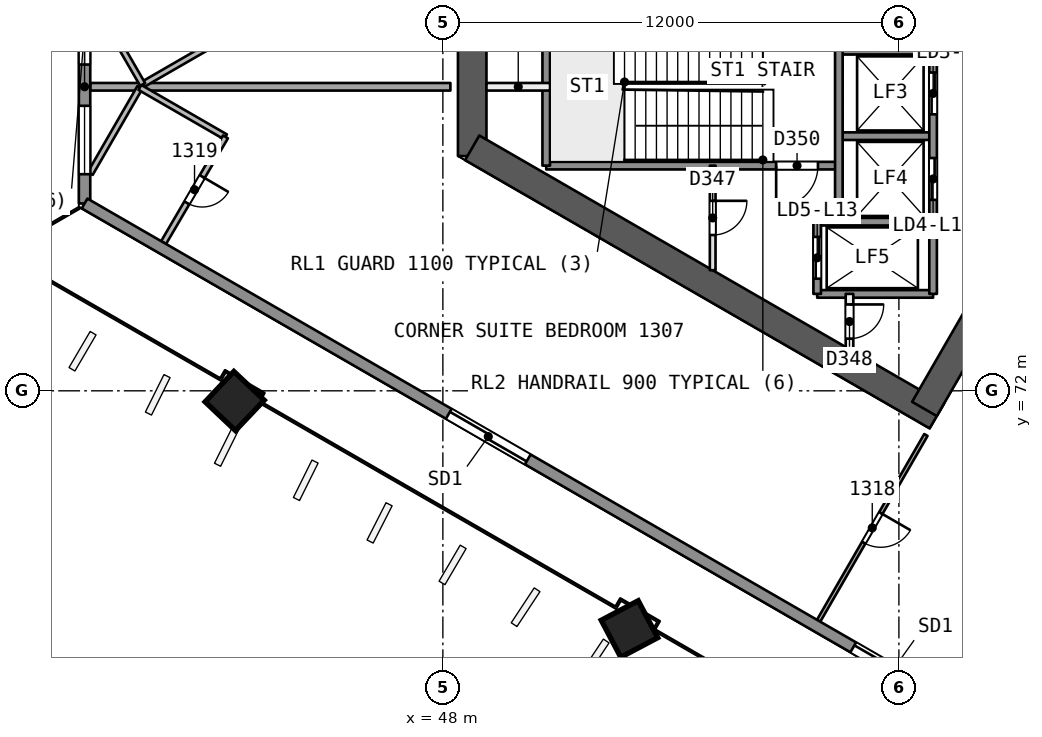
"""IFC4 building model, lengths in metres.
Left out: names, types, materials, properties, quantities, classifications, styles, units other than length and angle.
Written with IfcOpenShell. Run it as: python <this file> out.ifc"""

import sys

from ifc_helpers import new_model, si_unit, direction, frame, frame_2d, origin, origin_2d, place, context, subcontext, project, spatial, rectangle, extrude, element, fill, save


model = new_model("IFC4")
c1 = context("Model", 3, precision=1e-05, world=origin(), true_north=direction((0.0, 1.0)))
c2 = subcontext(c1, "Body", "Model", "MODEL_VIEW")
j1 = project(units=[si_unit("LENGTHUNIT", "METRE"), si_unit("PLANEANGLEUNIT", "RADIAN")], contexts=[c1])
p1 = place(None, origin())
s1 = spatial("IfcSite", under=j1, at=p1, CompositionType="ELEMENT")
p2 = place(p1, origin())
s2 = spatial("IfcBuilding", under=s1, at=p2, CompositionType="ELEMENT")
p3 = place(p2, frame((0.0, 0.0, 61.0)))
s3 = spatial("IfcBuildingStorey", under=s2, at=p3, CompositionType="ELEMENT", Elevation=61.0)
p4 = place(p3, frame((65.567, 80.0, 0.0), z_axis=(0.0, 0.0, 1.0), x_axis=(-0.499988615364, 0.866031976607, 0.0)))
e1 = element("IfcWall", 1, at=p4, inside=s3, PredefinedType="SHEAR", context=c2, shape_type="SweptSolid", body=[
    extrude(rectangle(XDim=10.163, YDim=0.75, at=frame_2d((5.082, 0.0))), origin(), (0.0, 0.0, 1.0), 3.7),
])
p5 = place(p4, frame((0.733, 0.0, 0.0)))
e2 = element("IfcOpeningElement", 2, at=p5, cuts=e1, PredefinedType="OPENING", context=c2, shape_type="SweptSolid", body=[
    extrude(rectangle(XDim=1.2, YDim=2.1, at=frame_2d((0.6, 1.05))), frame((0.0, 0.385, 0.0), z_axis=(0.0, -1.0, 0.0), x_axis=(1.0, 0.0, 0.0)), (0.0, 0.0, 1.0), 0.771),
])
p6 = place(p3, frame((48.772, 81.606, 0.0), z_axis=(0.0, 0.0, 1.0), x_axis=(0.0, -1.0, 0.0)))
e3 = element("IfcWall", 3, at=p6, inside=s3, PredefinedType="SHEAR", context=c2, shape_type="SweptSolid", body=[
    extrude(rectangle(XDim=3.429, YDim=0.75, at=frame_2d((1.714, 0.0))), origin(), (0.0, 0.0, 1.0), 3.7),
])
p7 = place(p3, frame((48.772, 78.394, 0.0), z_axis=(0.0, 0.0, 1.0), x_axis=(0.866028339916, -0.499994914436, 0.0)))
e4 = element("IfcWall", 4, at=p7, inside=s3, PredefinedType="SHEAR", context=c2, shape_type="SweptSolid", body=[
    extrude(rectangle(XDim=14.117, YDim=0.75, at=frame_2d((7.059, 0.0))), origin(), (0.0, 0.0, 1.0), 3.7),
])
p8 = place(p3, frame((60.673, 71.523, 0.0), z_axis=(0.0, 0.0, 1.0), x_axis=(0.499997052475, 0.866027105532, 0.0)))
e5 = element("IfcWall", 5, at=p8, inside=s3, PredefinedType="SHEAR", context=c2, shape_type="SweptSolid", body=[
    extrude(rectangle(XDim=10.005, YDim=0.75, at=frame_2d((5.002, 0.0))), origin(), (0.0, 0.0, 1.0), 3.7),
])
p9 = place(p8, frame((7.855, 0.0, 0.0)))
e6 = element("IfcOpeningElement", 6, at=p9, cuts=e5, PredefinedType="OPENING", context=c2, shape_type="SweptSolid", body=[
    extrude(rectangle(XDim=1.2, YDim=2.1, at=frame_2d((0.6, 1.05))), frame((0.0, 0.385, 0.0), z_axis=(0.0, -1.0, 0.0), x_axis=(1.0, 0.0, 0.0)), (0.0, 0.0, 1.0), 0.771),
])
p10 = place(p3, frame((42.487, 71.724, 0.0), z_axis=(0.028493212074, 0.006793520471, 0.999570900409), x_axis=(-0.865580919578, 0.50031701382, 0.021273395238)))
e7 = element("IfcColumn", 7, at=p10, inside=s3, PredefinedType="COLUMN", context=c2, shape_type="SweptSolid", body=[
    extrude(rectangle(XDim=1.1, YDim=1.1, at=origin_2d()), origin(), (0.0, 0.0, 1.0), 3.702),
])
p11 = place(p3, frame((52.887, 65.719, 0.0), z_axis=(0.019328516974, 0.012138044789, 0.999739504221), x_axis=(-0.865689041461, 0.500468616527, 0.010660551878)))
e8 = element("IfcColumn", 8, at=p11, inside=s3, PredefinedType="COLUMN", context=c2, shape_type="SweptSolid", body=[
    extrude(rectangle(XDim=1.1, YDim=1.1, at=origin_2d()), origin(), (0.0, 0.0, 1.0), 3.701),
])
p12 = place(p3, frame((42.352, 81.36, 0.0), z_axis=(0.0, 0.0, 1.0), x_axis=(-0.865997922154, -0.500047596559, 0.0)))
e9 = element("IfcWall", 9, at=p12, inside=s3, PredefinedType="PARTITIONING", context=c2, shape_type="SweptSolid", body=[
    extrude(rectangle(XDim=2.6, YDim=0.15, at=frame_2d((1.3, 0.0))), origin(), (0.0, 0.0, 1.0), 3.2),
])
p13 = place(p3, frame((40.1, 80.06, 0.0), z_axis=(0.0, 0.0, 1.0), x_axis=(-0.50001084716, 0.866019141083, 0.0)))
e10 = element("IfcWall", 10, at=p13, inside=s3, PredefinedType="PARTITIONING", context=c2, shape_type="SweptSolid", body=[
    extrude(rectangle(XDim=2.76, YDim=0.15, at=frame_2d((1.38, 0.0))), origin(), (0.0, 0.0, 1.0), 3.2),
])
p14 = place(p3, frame((38.72, 80.0, 0.0), z_axis=(0.0, 0.0, 1.0), x_axis=(1.0, 0.0, 0.0)))
e11 = element("IfcWall", 11, at=p14, inside=s3, PredefinedType="PARTITIONING", context=c2, shape_type="SweptSolid", body=[
    extrude(rectangle(XDim=9.478, YDim=0.2, at=frame_2d((4.739, 0.0))), origin(), (0.0, 0.0, 1.0), 3.2),
])
p15 = place(p3, frame((60.71, 70.838, 0.0), z_axis=(0.0, 0.0, 1.0), x_axis=(-0.49999444814, -0.866028609128, 0.0)))
e12 = element("IfcWall", 12, at=p15, inside=s3, PredefinedType="PARTITIONING", context=c2, shape_type="SweptSolid", body=[
    extrude(rectangle(XDim=5.646, YDim=0.1, at=frame_2d((2.823, 0.0))), origin(), (0.0, 0.0, 1.0), 3.2),
])
p16 = place(p15, frame((2.373, 0.0, 0.0)))
e13 = element("IfcOpeningElement", 13, at=p16, cuts=e12, PredefinedType="OPENING", context=c2, shape_type="SweptSolid", body=[
    extrude(rectangle(XDim=0.9, YDim=2.1, at=frame_2d((0.45, 1.05))), frame((0.0, 0.061, 0.0), z_axis=(0.0, -1.0, 0.0), x_axis=(1.0, 0.0, 0.0)), (0.0, 0.0, 1.0), 0.121),
])
p17 = place(p3, frame((38.72, 77.718, 0.0), z_axis=(0.0, 0.0, 1.0), x_axis=(0.499964911226, 0.86604566135, 0.0)))
e14 = element("IfcWall", 14, at=p17, inside=s3, PredefinedType="PARTITIONING", context=c2, shape_type="SweptSolid", body=[
    extrude(rectangle(XDim=2.615, YDim=0.15, at=frame_2d((1.308, 0.0))), origin(), (0.0, 0.0, 1.0), 3.2),
])
p18 = place(p3, frame((40.028, 79.982, 0.0), z_axis=(0.0, 0.0, 1.0), x_axis=(0.866021400173, -0.500006934395, 0.0)))
e15 = element("IfcWall", 15, at=p18, inside=s3, PredefinedType="PARTITIONING", context=c2, shape_type="SweptSolid", body=[
    extrude(rectangle(XDim=2.6, YDim=0.15, at=frame_2d((1.3, 0.0))), origin(), (0.0, 0.0, 1.0), 3.2),
])
p19 = place(p3, frame((42.279, 78.682, 0.0), z_axis=(0.0, 0.0, 1.0), x_axis=(-0.505132426168, -0.863041848367, 0.0)))
e16 = element("IfcWall", 16, at=p19, inside=s3, PredefinedType="PARTITIONING", context=c2, shape_type="SweptSolid", body=[
    extrude(rectangle(XDim=3.224, YDim=0.15, at=frame_2d((1.612, 0.0))), origin(), (0.0, 0.0, 1.0), 3.2),
])
p20 = place(p19, frame((1.212, 0.0, 0.0)))
e17 = element("IfcOpeningElement", 17, at=p20, cuts=e16, PredefinedType="OPENING", context=c2, shape_type="SweptSolid", body=[
    extrude(rectangle(XDim=0.8, YDim=2.1, at=frame_2d((0.4, 1.05))), frame((0.0, 0.085, 0.0), z_axis=(0.0, -1.0, 0.0), x_axis=(1.0, 0.0, 0.0)), (0.0, 0.0, 1.0), 0.171),
])
p21 = place(p3, frame((38.571, 76.929, 0.0), z_axis=(0.0, 0.0, 1.0), x_axis=(0.0, 1.0, 0.0)))
e18 = element("IfcWall", 18, at=p21, inside=s3, PredefinedType="SOLIDWALL", context=c2, shape_type="SweptSolid", body=[
    extrude(rectangle(XDim=6.143, YDim=0.3, at=frame_2d((3.071, 0.0))), origin(), (0.0, 0.0, 1.0), 3.2),
])
p22 = place(p21, frame((3.656, 0.0, 0.9)))
e19 = element("IfcOpeningElement", 19, at=p22, cuts=e18, PredefinedType="OPENING", context=c2, shape_type="SweptSolid", body=[
    extrude(rectangle(XDim=1.8, YDim=1.5, at=frame_2d((0.9, 0.75))), frame((0.0, 0.161, 0.0), z_axis=(0.0, -1.0, 0.0), x_axis=(1.0, 0.0, 0.0)), (0.0, 0.0, 1.0), 0.321),
])
p23 = place(p21, frame((0.771, 0.0, 0.9)))
e20 = element("IfcOpeningElement", 20, at=p23, cuts=e18, PredefinedType="OPENING", context=c2, shape_type="SweptSolid", body=[
    extrude(rectangle(XDim=1.8, YDim=1.5, at=frame_2d((0.9, 0.75))), frame((0.0, 0.161, 0.0), z_axis=(0.0, -1.0, 0.0), x_axis=(1.0, 0.0, 0.0)), (0.0, 0.0, 1.0), 0.321),
])
p24 = place(p3, frame((90.555, 46.916, 0.0), z_axis=(0.0, 0.0, 1.0), x_axis=(-0.866024926003, 0.500000827541, 0.0)))
e21 = element("IfcWall", 21, at=p24, inside=s3, PredefinedType="SOLIDWALL", context=c2, shape_type="SweptSolid", body=[
    extrude(rectangle(XDim=60.025, YDim=0.3, at=frame_2d((30.013, 0.0))), origin(), (0.0, 0.0, 1.0), 3.2),
])
p25 = place(p24, frame((28.813, 0.0, 0.0)))
e22 = element("IfcOpeningElement", 22, at=p25, cuts=e21, PredefinedType="OPENING", context=c2, shape_type="SweptSolid", body=[
    extrude(rectangle(XDim=2.4, YDim=2.4, at=frame_2d((1.2, 1.2))), frame((0.0, 0.161, 0.0), z_axis=(0.0, -1.0, 0.0), x_axis=(1.0, 0.0, 0.0)), (0.0, 0.0, 1.0), 0.321),
])
p26 = place(p24, frame((34.269, 0.0, 0.0)))
e23 = element("IfcOpeningElement", 23, at=p26, cuts=e21, PredefinedType="OPENING", context=c2, shape_type="SweptSolid", body=[
    extrude(rectangle(XDim=2.4, YDim=2.4, at=frame_2d((1.2, 1.2))), frame((0.0, 0.161, 0.0), z_axis=(0.0, -1.0, 0.0), x_axis=(1.0, 0.0, 0.0)), (0.0, 0.0, 1.0), 0.321),
])
p27 = place(p24, frame((46.558, 0.0, 0.0)))
e24 = element("IfcOpeningElement", 24, at=p27, cuts=e21, PredefinedType="OPENING", context=c2, shape_type="SweptSolid", body=[
    extrude(rectangle(XDim=2.4, YDim=2.4, at=frame_2d((1.2, 1.2))), frame((0.0, 0.161, 0.0), z_axis=(0.0, -1.0, 0.0), x_axis=(1.0, 0.0, 0.0)), (0.0, 0.0, 1.0), 0.321),
])
p28 = place(p24, frame((23.357, 0.0, 0.0)))
e25 = element("IfcOpeningElement", 25, at=p28, cuts=e21, PredefinedType="OPENING", context=c2, shape_type="SweptSolid", body=[
    extrude(rectangle(XDim=2.4, YDim=2.4, at=frame_2d((1.2, 1.2))), frame((0.0, 0.161, 0.0), z_axis=(0.0, -1.0, 0.0), x_axis=(1.0, 0.0, 0.0)), (0.0, 0.0, 1.0), 0.321),
])
p29 = place(p24, frame((11.109, 0.0, 0.0)))
e26 = element("IfcOpeningElement", 26, at=p29, cuts=e21, PredefinedType="OPENING", context=c2, shape_type="SweptSolid", body=[
    extrude(rectangle(XDim=2.4, YDim=2.4, at=frame_2d((1.2, 1.2))), frame((0.0, 0.161, 0.0), z_axis=(0.0, -1.0, 0.0), x_axis=(1.0, 0.0, 0.0)), (0.0, 0.0, 1.0), 0.321),
])
p30 = place(p3, frame((60.9, 80.95, 0.0), z_axis=(0.0, 0.0, 1.0), x_axis=(-1.0, 0.0, 0.0)))
e27 = element("IfcWall", 27, at=p30, inside=s3, PredefinedType="SOLIDWALL", context=c2, shape_type="SweptSolid", body=[
    extrude(rectangle(XDim=2.48, YDim=0.2, at=frame_2d((1.24, 0.0))), origin(), (0.0, 0.0, 1.0), 3.2),
])
p31 = place(p3, frame((50.82, 80.0, 0.0), z_axis=(0.0, 0.0, 1.0), x_axis=(-1.0, 0.0, 0.0)))
e28 = element("IfcWall", 28, at=p31, inside=s3, PredefinedType="PARTITIONING", context=c2, shape_type="SweptSolid", body=[
    extrude(rectangle(XDim=1.673, YDim=0.2, at=frame_2d((0.836, 0.0))), origin(), (0.0, 0.0, 1.0), 3.2),
])
p32 = place(p3, frame((60.9, 78.7, 0.0), z_axis=(0.0, 0.0, 1.0), x_axis=(-1.0, 0.0, 0.0)))
e29 = element("IfcWall", 29, at=p32, inside=s3, PredefinedType="SOLIDWALL", context=c2, shape_type="SweptSolid", body=[
    extrude(rectangle(XDim=2.48, YDim=0.2, at=frame_2d((1.24, 0.0))), origin(), (0.0, 0.0, 1.0), 3.2),
])
p33 = place(p3, frame((58.42, 77.925, 0.0), z_axis=(0.0, 0.0, 1.0), x_axis=(-1.0, 0.0, 0.0)))
e30 = element("IfcWall", 30, at=p33, inside=s3, PredefinedType="SOLIDWALL", context=c2, shape_type="SweptSolid", body=[
    extrude(rectangle(XDim=7.7, YDim=0.2, at=frame_2d((3.85, 0.0))), origin(), (0.0, 0.0, 1.0), 3.2),
])
p34 = place(p33, frame((0.55, 0.0, 0.0)))
e31 = element("IfcOpeningElement", 31, at=p34, cuts=e30, PredefinedType="OPENING", context=c2, shape_type="SweptSolid", body=[
    extrude(rectangle(XDim=1.1, YDim=2.1, at=frame_2d((0.55, 1.05))), frame((0.0, 0.11, 0.0), z_axis=(0.0, -1.0, 0.0), x_axis=(1.0, 0.0, 0.0)), (0.0, 0.0, 1.0), 0.221),
])
for number, where, z_axis, x_axis in (
    (32, (60.9, 76.45, 0.0), (0.0, 0.0, 1.0), (-1.0, 0.0, 0.0)),
    (33, (60.9, 74.55, 0.0), (0.0, 0.0, 1.0), (-1.0, 0.0, 0.0)),
):
    element("IfcWall", number, at=place(p3, frame(where, z_axis=z_axis, x_axis=x_axis)), inside=s3, PredefinedType="SOLIDWALL", context=c2, shape_type="SweptSolid", body=[
        extrude(rectangle(XDim=3.05, YDim=0.2, at=frame_2d((1.525, 0.0))), origin(), (0.0, 0.0, 1.0), 3.2),
    ])
p35 = place(p3, frame((60.9, 85.45, 0.0), z_axis=(0.0, 0.0, 1.0), x_axis=(0.0, -1.0, 0.0)))
e34 = element("IfcWall", 34, at=p35, inside=s3, PredefinedType="SOLIDWALL", context=c2, shape_type="SweptSolid", body=[
    extrude(rectangle(XDim=10.9, YDim=0.2, at=frame_2d((5.45, 0.0))), origin(), (0.0, 0.0, 1.0), 3.2),
])
p36 = place(p35, frame((0.575, 0.0, 0.0)))
e35 = element("IfcOpeningElement", 35, at=p36, cuts=e34, PredefinedType="OPENING", context=c2, shape_type="SweptSolid", body=[
    extrude(rectangle(XDim=1.1, YDim=2.1, at=frame_2d((0.55, 1.05))), frame((0.0, 0.11, 0.0), z_axis=(0.0, -1.0, 0.0), x_axis=(1.0, 0.0, 0.0)), (0.0, 0.0, 1.0), 0.221),
])
p37 = place(p35, frame((2.825, 0.0, 0.0)))
e36 = element("IfcOpeningElement", 36, at=p37, cuts=e34, PredefinedType="OPENING", context=c2, shape_type="SweptSolid", body=[
    extrude(rectangle(XDim=1.1, YDim=2.1, at=frame_2d((0.55, 1.05))), frame((0.0, 0.11, 0.0), z_axis=(0.0, -1.0, 0.0), x_axis=(1.0, 0.0, 0.0)), (0.0, 0.0, 1.0), 0.221),
])
p38 = place(p35, frame((5.075, 0.0, 0.0)))
e37 = element("IfcOpeningElement", 37, at=p38, cuts=e34, PredefinedType="OPENING", context=c2, shape_type="SweptSolid", body=[
    extrude(rectangle(XDim=1.1, YDim=2.1, at=frame_2d((0.55, 1.05))), frame((0.0, 0.11, 0.0), z_axis=(0.0, -1.0, 0.0), x_axis=(1.0, 0.0, 0.0)), (0.0, 0.0, 1.0), 0.221),
])
p39 = place(p35, frame((7.325, 0.0, 0.0)))
e38 = element("IfcOpeningElement", 38, at=p39, cuts=e34, PredefinedType="OPENING", context=c2, shape_type="SweptSolid", body=[
    extrude(rectangle(XDim=1.1, YDim=2.1, at=frame_2d((0.55, 1.05))), frame((0.0, 0.11, 0.0), z_axis=(0.0, -1.0, 0.0), x_axis=(1.0, 0.0, 0.0)), (0.0, 0.0, 1.0), 0.221),
])
p40 = place(p3, frame((58.7, 74.55, 0.0), z_axis=(0.0, 0.0, 1.0), x_axis=(0.0, -1.0, 0.0)))
e39 = element("IfcWall", 39, at=p40, inside=s3, PredefinedType="PARTITIONING", context=c2, shape_type="SweptSolid", body=[
    extrude(rectangle(XDim=1.455, YDim=0.2, at=frame_2d((0.728, 0.0))), origin(), (0.0, 0.0, 1.0), 3.2),
])
p41 = place(p40, frame((0.278, 0.0, 0.0)))
e40 = element("IfcOpeningElement", 40, at=p41, cuts=e39, PredefinedType="OPENING", context=c2, shape_type="SweptSolid", body=[
    extrude(rectangle(XDim=0.9, YDim=2.1, at=frame_2d((0.45, 1.05))), frame((0.0, 0.11, 0.0), z_axis=(0.0, -1.0, 0.0), x_axis=(1.0, 0.0, 0.0)), (0.0, 0.0, 1.0), 0.221),
])
p42 = place(p3, frame((58.42, 85.45, 0.0), z_axis=(0.0, 0.0, 1.0), x_axis=(0.0, -1.0, 0.0)))
e41 = element("IfcWall", 41, at=p42, inside=s3, PredefinedType="SOLIDWALL", context=c2, shape_type="SweptSolid", body=[
    extrude(rectangle(XDim=9.0, YDim=0.2, at=frame_2d((4.5, 0.0))), origin(), (0.0, 0.0, 1.0), 3.2),
])
p43 = place(p3, frame((57.85, 76.45, 0.0), z_axis=(0.0, 0.0, 1.0), x_axis=(0.0, -1.0, 0.0)))
e42 = element("IfcWall", 42, at=p43, inside=s3, PredefinedType="SOLIDWALL", context=c2, shape_type="SweptSolid", body=[
    extrude(rectangle(XDim=1.9, YDim=0.2, at=frame_2d((0.95, 0.0))), origin(), (0.0, 0.0, 1.0), 3.2),
])
p44 = place(p43, frame((0.4, 0.0, 0.0)))
e43 = element("IfcOpeningElement", 43, at=p44, cuts=e42, PredefinedType="OPENING", context=c2, shape_type="SweptSolid", body=[
    extrude(rectangle(XDim=1.1, YDim=2.1, at=frame_2d((0.55, 1.05))), frame((0.0, 0.11, 0.0), z_axis=(0.0, -1.0, 0.0), x_axis=(1.0, 0.0, 0.0)), (0.0, 0.0, 1.0), 0.221),
])
p45 = place(p3, frame((55.1, 77.925, 0.0), z_axis=(0.0, 0.0, 1.0), x_axis=(0.0, -1.0, 0.0)))
e44 = element("IfcWall", 44, at=p45, inside=s3, PredefinedType="PARTITIONING", context=c2, shape_type="SweptSolid", body=[
    extrude(rectangle(XDim=2.752, YDim=0.15, at=frame_2d((1.376, 0.0))), origin(), (0.0, 0.0, 1.0), 3.2),
])
p46 = place(p45, frame((0.926, 0.0, 0.0)))
e45 = element("IfcOpeningElement", 45, at=p46, cuts=e44, PredefinedType="OPENING", context=c2, shape_type="SweptSolid", body=[
    extrude(rectangle(XDim=0.9, YDim=2.1, at=frame_2d((0.45, 1.05))), frame((0.0, 0.085, 0.0), z_axis=(0.0, -1.0, 0.0), x_axis=(1.0, 0.0, 0.0)), (0.0, 0.0, 1.0), 0.171),
])
p47 = place(p3, frame((50.72, 82.075, 0.0), z_axis=(0.0, 0.0, 1.0), x_axis=(0.0, -1.0, 0.0)))
e46 = element("IfcWall", 46, at=p47, inside=s3, PredefinedType="SOLIDWALL", context=c2, shape_type="SweptSolid", body=[
    extrude(rectangle(XDim=4.15, YDim=0.2, at=frame_2d((2.075, 0.0))), origin(), (0.0, 0.0, 1.0), 3.2),
])
p48 = place(p16, origin())
e47 = element("IfcDoor", 47, at=p48, inside=s3, OperationType="SINGLE_SWING_LEFT", PredefinedType="NOTDEFINED", context=c2, shape_type="SweptSolid", body=[
    extrude(rectangle(XDim=0.9, YDim=2.1, at=frame_2d((0.45, 1.05))), frame((0.0, 0.025, 0.0), z_axis=(0.0, -1.0, 0.0), x_axis=(1.0, 0.0, 0.0)), (0.0, 0.0, 1.0), 0.05),
])
fill(e13, e47)
p49 = place(p20, origin())
e48 = element("IfcDoor", 48, at=p49, inside=s3, OperationType="SINGLE_SWING_LEFT", PredefinedType="NOTDEFINED", context=c2, shape_type="SweptSolid", body=[
    extrude(rectangle(XDim=0.8, YDim=2.1, at=frame_2d((0.4, 1.05))), frame((0.0, 0.025, 0.0), z_axis=(0.0, -1.0, 0.0), x_axis=(1.0, 0.0, 0.0)), (0.0, 0.0, 1.0), 0.05),
])
fill(e17, e48)
p50 = place(p22, origin())
e49 = element("IfcWindow", 49, at=p50, inside=s3, PartitioningType="SINGLE_PANEL", PredefinedType="WINDOW", context=c2, shape_type="SweptSolid", body=[
    extrude(rectangle(XDim=1.8, YDim=1.5, at=frame_2d((0.9, 0.75))), frame((0.0, 0.03, 0.0), z_axis=(0.0, -1.0, 0.0), x_axis=(1.0, 0.0, 0.0)), (0.0, 0.0, 1.0), 0.06),
])
fill(e19, e49)
p51 = place(p23, origin())
e50 = element("IfcWindow", 50, at=p51, inside=s3, PartitioningType="SINGLE_PANEL", PredefinedType="WINDOW", context=c2, shape_type="SweptSolid", body=[
    extrude(rectangle(XDim=1.8, YDim=1.5, at=frame_2d((0.9, 0.75))), frame((0.0, 0.03, 0.0), z_axis=(0.0, -1.0, 0.0), x_axis=(1.0, 0.0, 0.0)), (0.0, 0.0, 1.0), 0.06),
])
fill(e20, e50)
p52 = place(p26, origin())
e51 = element("IfcDoor", 51, at=p52, inside=s3, OperationType="SLIDING_TO_RIGHT", PredefinedType="NOTDEFINED", context=c2, shape_type="SweptSolid", body=[
    extrude(rectangle(XDim=2.4, YDim=2.4, at=frame_2d((1.2, 1.2))), frame((0.0, 0.025, 0.0), z_axis=(0.0, -1.0, 0.0), x_axis=(1.0, 0.0, 0.0)), (0.0, 0.0, 1.0), 0.05),
])
fill(e23, e51)
p53 = place(p27, origin())
e52 = element("IfcDoor", 52, at=p53, inside=s3, OperationType="SLIDING_TO_LEFT", PredefinedType="NOTDEFINED", context=c2, shape_type="SweptSolid", body=[
    extrude(rectangle(XDim=2.4, YDim=2.4, at=frame_2d((1.2, 1.2))), frame((0.0, 0.025, 0.0), z_axis=(0.0, -1.0, 0.0), x_axis=(1.0, 0.0, 0.0)), (0.0, 0.0, 1.0), 0.05),
])
fill(e24, e52)
p54 = place(p38, origin())
e53 = element("IfcDoor", 53, at=p54, inside=s3, OperationType="SLIDING_TO_RIGHT", PredefinedType="NOTDEFINED", context=c2, shape_type="SweptSolid", body=[
    extrude(rectangle(XDim=1.1, YDim=2.1, at=frame_2d((0.55, 1.05))), frame((0.0, 0.025, 0.0), z_axis=(0.0, -1.0, 0.0), x_axis=(1.0, 0.0, 0.0)), (0.0, 0.0, 1.0), 0.05),
])
fill(e37, e53)
p55 = place(p39, origin())
e54 = element("IfcDoor", 54, at=p55, inside=s3, OperationType="SLIDING_TO_LEFT", PredefinedType="NOTDEFINED", context=c2, shape_type="SweptSolid", body=[
    extrude(rectangle(XDim=1.1, YDim=2.1, at=frame_2d((0.55, 1.05))), frame((0.0, 0.025, 0.0), z_axis=(0.0, -1.0, 0.0), x_axis=(1.0, 0.0, 0.0)), (0.0, 0.0, 1.0), 0.05),
])
fill(e38, e54)
p56 = place(p44, origin())
e55 = element("IfcDoor", 55, at=p56, inside=s3, OperationType="SLIDING_TO_RIGHT", PredefinedType="NOTDEFINED", context=c2, shape_type="SweptSolid", body=[
    extrude(rectangle(XDim=1.1, YDim=2.1, at=frame_2d((0.55, 1.05))), frame((0.0, 0.025, 0.0), z_axis=(0.0, -1.0, 0.0), x_axis=(1.0, 0.0, 0.0)), (0.0, 0.0, 1.0), 0.05),
])
fill(e43, e55)
p57 = place(p46, origin())
e56 = element("IfcDoor", 56, at=p57, inside=s3, OperationType="SINGLE_SWING_LEFT", PredefinedType="NOTDEFINED", context=c2, shape_type="SweptSolid", body=[
    extrude(rectangle(XDim=0.9, YDim=2.1, at=frame_2d((0.45, 1.05))), frame((0.0, 0.025, 0.0), z_axis=(0.0, -1.0, 0.0), x_axis=(1.0, 0.0, 0.0)), (0.0, 0.0, 1.0), 0.05),
])
fill(e45, e56)
p58 = place(p41, origin())
e57 = element("IfcDoor", 57, at=p58, inside=s3, OperationType="SINGLE_SWING_LEFT", PredefinedType="NOTDEFINED", context=c2, shape_type="SweptSolid", body=[
    extrude(rectangle(XDim=0.9, YDim=2.1, at=frame_2d((0.45, 1.05))), frame((0.0, 0.025, 0.0), z_axis=(0.0, -1.0, 0.0), x_axis=(1.0, 0.0, 0.0)), (0.0, 0.0, 1.0), 0.05),
])
fill(e40, e57)
p59 = place(p34, origin())
e58 = element("IfcDoor", 58, at=p59, inside=s3, OperationType="SINGLE_SWING_RIGHT", PredefinedType="NOTDEFINED", context=c2, shape_type="SweptSolid", body=[
    extrude(rectangle(XDim=1.1, YDim=2.1, at=frame_2d((0.55, 1.05))), frame((0.0, 0.025, 0.0), z_axis=(0.0, -1.0, 0.0), x_axis=(1.0, 0.0, 0.0)), (0.0, 0.0, 1.0), 0.05),
])
fill(e31, e58)
save(model, sys.argv[1])
